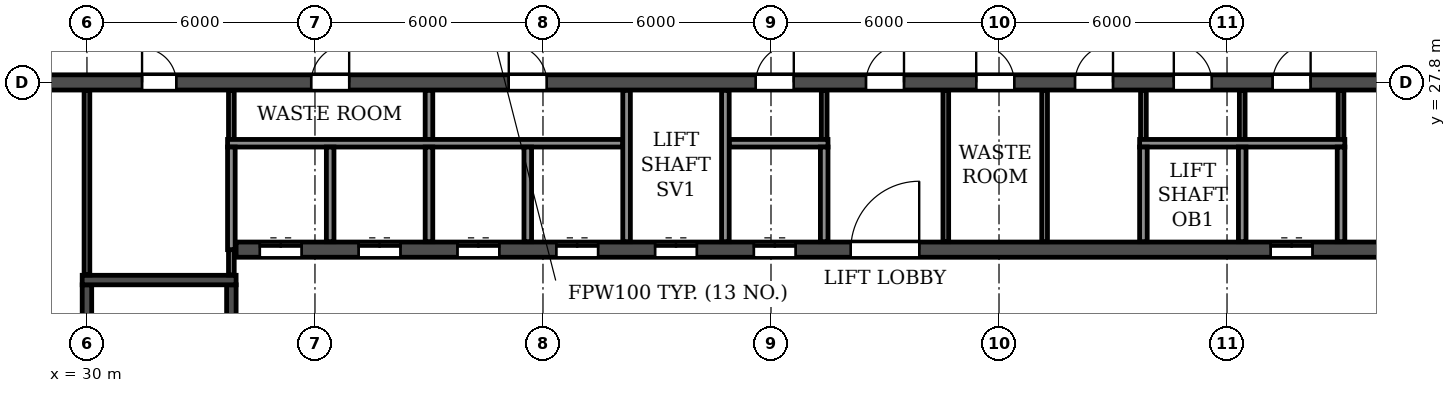
"""IFC4 building model, lengths in metres.
Left out: names, types, materials, properties, quantities, classifications, styles, units other than length and angle.
Written with IfcOpenShell. Run it as: python <this file> out.ifc"""

import sys

from ifc_helpers import new_model, si_unit, direction, frame, frame_2d, origin, place, context, subcontext, project, spatial, rectangle, extrude, element, fill, save


model = new_model("IFC4")
c1 = context("Model", 3, precision=1e-05, world=origin(), true_north=direction((0.0, 1.0)))
c2 = subcontext(c1, "Body", "Model", "MODEL_VIEW")
j1 = project(units=[si_unit("LENGTHUNIT", "METRE"), si_unit("PLANEANGLEUNIT", "RADIAN")], contexts=[c1])
p1 = place(None, origin())
s1 = spatial("IfcSite", under=j1, at=p1, CompositionType="ELEMENT")
p2 = place(p1, origin())
s2 = spatial("IfcBuilding", under=s1, at=p2, CompositionType="ELEMENT")
p3 = place(p2, frame((0.0, 0.0, 208.2)))
s3 = spatial("IfcBuildingStorey", under=s2, at=p3, CompositionType="ELEMENT", Elevation=208.2)
p4 = place(p3, frame((18.2, 27.8, 0.0), z_axis=(0.0, 0.0, 1.0), x_axis=(1.0, 0.0, 0.0)))
e1 = element("IfcWall", 1, at=p4, inside=s3, PredefinedType="SOLIDWALL", context=c2, shape_type="SweptSolid", body=[
    extrude(rectangle(XDim=65.6, YDim=0.4, at=frame_2d((32.8, 0.0))), origin(), (0.0, 0.0, 1.0), 3.0),
])
p5 = place(p4, frame((0.7, 0.0, 0.0)))
e2 = element("IfcOpeningElement", 2, at=p5, cuts=e1, PredefinedType="OPENING", context=c2, shape_type="SweptSolid", body=[
    extrude(rectangle(XDim=1.0, YDim=2.1, at=frame_2d((0.5, 1.05))), frame((0.0, 0.21, 0.0), z_axis=(0.0, -1.0, 0.0), x_axis=(1.0, 0.0, 0.0)), (0.0, 0.0, 1.0), 0.42),
])
p6 = place(p4, frame((4.05, 0.0, 0.0)))
e3 = element("IfcOpeningElement", 3, at=p6, cuts=e1, PredefinedType="OPENING", context=c2, shape_type="SweptSolid", body=[
    extrude(rectangle(XDim=0.9, YDim=2.1, at=frame_2d((0.45, 1.05))), frame((0.0, 0.21, 0.0), z_axis=(0.0, -1.0, 0.0), x_axis=(1.0, 0.0, 0.0)), (0.0, 0.0, 1.0), 0.42),
])
p7 = place(p4, frame((13.25, 0.0, 0.0)))
e4 = element("IfcOpeningElement", 4, at=p7, cuts=e1, PredefinedType="OPENING", context=c2, shape_type="SweptSolid", body=[
    extrude(rectangle(XDim=0.9, YDim=2.1, at=frame_2d((0.45, 1.05))), frame((0.0, 0.21, 0.0), z_axis=(0.0, -1.0, 0.0), x_axis=(1.0, 0.0, 0.0)), (0.0, 0.0, 1.0), 0.42),
])
p8 = place(p4, frame((17.7, 0.0, 0.0)))
e5 = element("IfcOpeningElement", 5, at=p8, cuts=e1, PredefinedType="OPENING", context=c2, shape_type="SweptSolid", body=[
    extrude(rectangle(XDim=1.0, YDim=2.1, at=frame_2d((0.5, 1.05))), frame((0.0, 0.21, 0.0), z_axis=(0.0, -1.0, 0.0), x_axis=(1.0, 0.0, 0.0)), (0.0, 0.0, 1.0), 0.42),
])
p9 = place(p4, frame((22.9, 0.0, 0.0)))
e6 = element("IfcOpeningElement", 6, at=p9, cuts=e1, PredefinedType="OPENING", context=c2, shape_type="SweptSolid", body=[
    extrude(rectangle(XDim=1.0, YDim=2.1, at=frame_2d((0.5, 1.05))), frame((0.0, 0.21, 0.0), z_axis=(0.0, -1.0, 0.0), x_axis=(1.0, 0.0, 0.0)), (0.0, 0.0, 1.0), 0.42),
])
p10 = place(p4, frame((29.4, 0.0, 0.0)))
e7 = element("IfcOpeningElement", 7, at=p10, cuts=e1, PredefinedType="OPENING", context=c2, shape_type="SweptSolid", body=[
    extrude(rectangle(XDim=1.0, YDim=2.1, at=frame_2d((0.5, 1.05))), frame((0.0, 0.21, 0.0), z_axis=(0.0, -1.0, 0.0), x_axis=(1.0, 0.0, 0.0)), (0.0, 0.0, 1.0), 0.42),
])
p11 = place(p4, frame((32.3, 0.0, 0.0)))
e8 = element("IfcOpeningElement", 8, at=p11, cuts=e1, PredefinedType="OPENING", context=c2, shape_type="SweptSolid", body=[
    extrude(rectangle(XDim=1.0, YDim=2.1, at=frame_2d((0.5, 1.05))), frame((0.0, 0.21, 0.0), z_axis=(0.0, -1.0, 0.0), x_axis=(1.0, 0.0, 0.0)), (0.0, 0.0, 1.0), 0.42),
])
p12 = place(p4, frame((35.2, 0.0, 0.0)))
e9 = element("IfcOpeningElement", 9, at=p12, cuts=e1, PredefinedType="OPENING", context=c2, shape_type="SweptSolid", body=[
    extrude(rectangle(XDim=1.0, YDim=2.1, at=frame_2d((0.5, 1.05))), frame((0.0, 0.21, 0.0), z_axis=(0.0, -1.0, 0.0), x_axis=(1.0, 0.0, 0.0)), (0.0, 0.0, 1.0), 0.42),
])
p13 = place(p4, frame((37.8, 0.0, 0.0)))
e10 = element("IfcOpeningElement", 10, at=p13, cuts=e1, PredefinedType="OPENING", context=c2, shape_type="SweptSolid", body=[
    extrude(rectangle(XDim=1.0, YDim=2.1, at=frame_2d((0.5, 1.05))), frame((0.0, 0.21, 0.0), z_axis=(0.0, -1.0, 0.0), x_axis=(1.0, 0.0, 0.0)), (0.0, 0.0, 1.0), 0.42),
])
p14 = place(p4, frame((40.4, 0.0, 0.0)))
e11 = element("IfcOpeningElement", 11, at=p14, cuts=e1, PredefinedType="OPENING", context=c2, shape_type="SweptSolid", body=[
    extrude(rectangle(XDim=1.0, YDim=2.1, at=frame_2d((0.5, 1.05))), frame((0.0, 0.21, 0.0), z_axis=(0.0, -1.0, 0.0), x_axis=(1.0, 0.0, 0.0)), (0.0, 0.0, 1.0), 0.42),
])
p15 = place(p4, frame((43.0, 0.0, 0.0)))
e12 = element("IfcOpeningElement", 12, at=p15, cuts=e1, PredefinedType="OPENING", context=c2, shape_type="SweptSolid", body=[
    extrude(rectangle(XDim=1.0, YDim=2.1, at=frame_2d((0.5, 1.05))), frame((0.0, 0.21, 0.0), z_axis=(0.0, -1.0, 0.0), x_axis=(1.0, 0.0, 0.0)), (0.0, 0.0, 1.0), 0.42),
])
p16 = place(p4, frame((46.9, 0.0, 0.0)))
e13 = element("IfcOpeningElement", 13, at=p16, cuts=e1, PredefinedType="OPENING", context=c2, shape_type="SweptSolid", body=[
    extrude(rectangle(XDim=1.0, YDim=2.1, at=frame_2d((0.5, 1.05))), frame((0.0, 0.21, 0.0), z_axis=(0.0, -1.0, 0.0), x_axis=(1.0, 0.0, 0.0)), (0.0, 0.0, 1.0), 0.42),
])
p17 = place(p4, frame((51.45, 0.0, 0.0)))
e14 = element("IfcOpeningElement", 14, at=p17, cuts=e1, PredefinedType="OPENING", context=c2, shape_type="SweptSolid", body=[
    extrude(rectangle(XDim=0.9, YDim=2.1, at=frame_2d((0.45, 1.05))), frame((0.0, 0.21, 0.0), z_axis=(0.0, -1.0, 0.0), x_axis=(1.0, 0.0, 0.0)), (0.0, 0.0, 1.0), 0.42),
])
p18 = place(p4, frame((60.65, 0.0, 0.0)))
e15 = element("IfcOpeningElement", 15, at=p18, cuts=e1, PredefinedType="OPENING", context=c2, shape_type="SweptSolid", body=[
    extrude(rectangle(XDim=0.9, YDim=2.1, at=frame_2d((0.45, 1.05))), frame((0.0, 0.21, 0.0), z_axis=(0.0, -1.0, 0.0), x_axis=(1.0, 0.0, 0.0)), (0.0, 0.0, 1.0), 0.42),
])
p19 = place(p4, frame((63.9, 0.0, 0.0)))
e16 = element("IfcOpeningElement", 16, at=p19, cuts=e1, PredefinedType="OPENING", context=c2, shape_type="SweptSolid", body=[
    extrude(rectangle(XDim=1.0, YDim=2.1, at=frame_2d((0.5, 1.05))), frame((0.0, 0.21, 0.0), z_axis=(0.0, -1.0, 0.0), x_axis=(1.0, 0.0, 0.0)), (0.0, 0.0, 1.0), 0.42),
])
p20 = place(p3, frame((33.925, 23.4, 0.0), z_axis=(0.0, 0.0, 1.0), x_axis=(1.0, 0.0, 0.0)))
e17 = element("IfcWall", 17, at=p20, inside=s3, PredefinedType="SOLIDWALL", context=c2, shape_type="SweptSolid", body=[
    extrude(rectangle(XDim=34.15, YDim=0.4, at=frame_2d((17.075, 0.0))), origin(), (0.0, 0.0, 1.0), 3.0),
])
p21 = place(p20, frame((16.175, 0.0, 0.0)))
e18 = element("IfcOpeningElement", 18, at=p21, cuts=e17, PredefinedType="OPENING", context=c2, shape_type="SweptSolid", body=[
    extrude(rectangle(XDim=1.8, YDim=2.1, at=frame_2d((0.9, 1.05))), frame((0.0, 0.21, 0.0), z_axis=(0.0, -1.0, 0.0), x_axis=(1.0, 0.0, 0.0)), (0.0, 0.0, 1.0), 0.42),
])
p22 = place(p20, frame((0.625, 0.0, 0.0)))
e19 = element("IfcOpeningElement", 19, at=p22, cuts=e17, PredefinedType="OPENING", context=c2, shape_type="SweptSolid", body=[
    extrude(rectangle(XDim=1.1, YDim=2.1, at=frame_2d((0.55, 1.05))), frame((0.0, 0.21, 0.0), z_axis=(0.0, -1.0, 0.0), x_axis=(1.0, 0.0, 0.0)), (0.0, 0.0, 1.0), 0.42),
])
p23 = place(p20, frame((3.225, 0.0, 0.0)))
e20 = element("IfcOpeningElement", 20, at=p23, cuts=e17, PredefinedType="OPENING", context=c2, shape_type="SweptSolid", body=[
    extrude(rectangle(XDim=1.1, YDim=2.1, at=frame_2d((0.55, 1.05))), frame((0.0, 0.21, 0.0), z_axis=(0.0, -1.0, 0.0), x_axis=(1.0, 0.0, 0.0)), (0.0, 0.0, 1.0), 0.42),
])
p24 = place(p20, frame((5.825, 0.0, 0.0)))
e21 = element("IfcOpeningElement", 21, at=p24, cuts=e17, PredefinedType="OPENING", context=c2, shape_type="SweptSolid", body=[
    extrude(rectangle(XDim=1.1, YDim=2.1, at=frame_2d((0.55, 1.05))), frame((0.0, 0.21, 0.0), z_axis=(0.0, -1.0, 0.0), x_axis=(1.0, 0.0, 0.0)), (0.0, 0.0, 1.0), 0.42),
])
p25 = place(p20, frame((8.425, 0.0, 0.0)))
e22 = element("IfcOpeningElement", 22, at=p25, cuts=e17, PredefinedType="OPENING", context=c2, shape_type="SweptSolid", body=[
    extrude(rectangle(XDim=1.1, YDim=2.1, at=frame_2d((0.55, 1.05))), frame((0.0, 0.21, 0.0), z_axis=(0.0, -1.0, 0.0), x_axis=(1.0, 0.0, 0.0)), (0.0, 0.0, 1.0), 0.42),
])
p26 = place(p20, frame((11.025, 0.0, 0.0)))
e23 = element("IfcOpeningElement", 23, at=p26, cuts=e17, PredefinedType="OPENING", context=c2, shape_type="SweptSolid", body=[
    extrude(rectangle(XDim=1.1, YDim=2.1, at=frame_2d((0.55, 1.05))), frame((0.0, 0.21, 0.0), z_axis=(0.0, -1.0, 0.0), x_axis=(1.0, 0.0, 0.0)), (0.0, 0.0, 1.0), 0.42),
])
p27 = place(p20, frame((13.625, 0.0, 0.0)))
e24 = element("IfcOpeningElement", 24, at=p27, cuts=e17, PredefinedType="OPENING", context=c2, shape_type="SweptSolid", body=[
    extrude(rectangle(XDim=1.1, YDim=2.1, at=frame_2d((0.55, 1.05))), frame((0.0, 0.21, 0.0), z_axis=(0.0, -1.0, 0.0), x_axis=(1.0, 0.0, 0.0)), (0.0, 0.0, 1.0), 0.42),
])
p28 = place(p20, frame((27.225, 0.0, 0.0)))
e25 = element("IfcOpeningElement", 25, at=p28, cuts=e17, PredefinedType="OPENING", context=c2, shape_type="SweptSolid", body=[
    extrude(rectangle(XDim=1.1, YDim=2.1, at=frame_2d((0.55, 1.05))), frame((0.0, 0.21, 0.0), z_axis=(0.0, -1.0, 0.0), x_axis=(1.0, 0.0, 0.0)), (0.0, 0.0, 1.0), 0.42),
])
p29 = place(p3, frame((30.0, 14.8, 0.0), z_axis=(0.0, 0.0, 1.0), x_axis=(0.0, 1.0, 0.0)))
e26 = element("IfcWall", 26, at=p29, inside=s3, PredefinedType="SOLIDWALL", context=c2, shape_type="SweptSolid", body=[
    extrude(rectangle(XDim=7.675, YDim=0.25, at=frame_2d((3.837, 0.0))), origin(), (0.0, 0.0, 1.0), 3.0),
])
p30 = place(p3, frame((33.8, 14.8, 0.0), z_axis=(0.0, 0.0, 1.0), x_axis=(0.0, 1.0, 0.0)))
e27 = element("IfcWall", 27, at=p30, inside=s3, PredefinedType="SOLIDWALL", context=c2, shape_type="SweptSolid", body=[
    extrude(rectangle(XDim=7.675, YDim=0.25, at=frame_2d((3.837, 0.0))), origin(), (0.0, 0.0, 1.0), 3.0),
])
p31 = place(p30, frame((0.5, 0.0, 0.0)))
e28 = element("IfcOpeningElement", 28, at=p31, cuts=e27, PredefinedType="OPENING", context=c2, shape_type="SweptSolid", body=[
    extrude(rectangle(XDim=1.0, YDim=2.1, at=frame_2d((0.5, 1.05))), frame((0.0, 0.135, 0.0), z_axis=(0.0, -1.0, 0.0), x_axis=(1.0, 0.0, 0.0)), (0.0, 0.0, 1.0), 0.27),
])
p32 = place(p3, frame((29.875, 22.6, 0.0), z_axis=(0.0, 0.0, 1.0), x_axis=(1.0, 0.0, 0.0)))
e29 = element("IfcWall", 29, at=p32, inside=s3, PredefinedType="SOLIDWALL", context=c2, shape_type="SweptSolid", body=[
    extrude(rectangle(XDim=4.05, YDim=0.25, at=frame_2d((2.025, 0.0))), origin(), (0.0, 0.0, 1.0), 3.0),
])
p33 = place(p3, frame((49.4, 26.3, 0.0), z_axis=(0.0, 0.0, 1.0), x_axis=(0.0, 1.0, 0.0)))
e30 = element("IfcWall", 30, at=p33, inside=s3, PredefinedType="PARTITIONING", context=c2, shape_type="SweptSolid", body=[
    extrude(rectangle(XDim=1.29, YDim=0.15, at=frame_2d((0.645, 0.0))), origin(), (0.0, 0.0, 1.0), 3.0),
])
for number, where, z_axis, x_axis in (
    (31, (52.6, 23.61, 0.0), (0.0, 0.0, 1.0), (0.0, 1.0, 0.0)),
    (32, (55.2, 23.61, 0.0), (0.0, 0.0, 1.0), (0.0, 1.0, 0.0)),
):
    element("IfcWall", number, at=place(p3, frame(where, z_axis=z_axis, x_axis=x_axis)), inside=s3, PredefinedType="PARTITIONING", context=c2, shape_type="SweptSolid", body=[
        extrude(rectangle(XDim=3.98, YDim=0.15, at=frame_2d((1.99, 0.0))), origin(), (0.0, 0.0, 1.0), 3.0),
    ])
for number, where, z_axis, x_axis in (
    (33, (57.8, 26.3, 0.0), (0.0, 0.0, 1.0), (0.0, 1.0, 0.0)),
    (34, (60.4, 26.3, 0.0), (0.0, 0.0, 1.0), (0.0, 1.0, 0.0)),
    (35, (63.0, 26.3, 0.0), (0.0, 0.0, 1.0), (0.0, 1.0, 0.0)),
):
    element("IfcWall", number, at=place(p3, frame(where, z_axis=z_axis, x_axis=x_axis)), inside=s3, PredefinedType="PARTITIONING", context=c2, shape_type="SweptSolid", body=[
        extrude(rectangle(XDim=1.29, YDim=0.15, at=frame_2d((0.645, 0.0))), origin(), (0.0, 0.0, 1.0), 3.0),
    ])
p34 = place(p3, frame((39.0, 26.3, 0.0), z_axis=(0.0, 0.0, 1.0), x_axis=(0.0, 1.0, 0.0)))
e36 = element("IfcWall", 36, at=p34, inside=s3, PredefinedType="PARTITIONING", context=c2, shape_type="SweptSolid", body=[
    extrude(rectangle(XDim=1.29, YDim=0.2, at=frame_2d((0.645, 0.0))), origin(), (0.0, 0.0, 1.0), 3.0),
])
p35 = place(p3, frame((30.0, 22.735, 0.0), z_axis=(0.0, 0.0, 1.0), x_axis=(0.0, 1.0, 0.0)))
e37 = element("IfcWall", 37, at=p35, inside=s3, PredefinedType="PARTITIONING", context=c2, shape_type="SweptSolid", body=[
    extrude(rectangle(XDim=4.855, YDim=0.15, at=frame_2d((2.427, 0.0))), origin(), (0.0, 0.0, 1.0), 3.0),
])
p36 = place(p3, frame((33.8, 22.735, 0.0), z_axis=(0.0, 0.0, 1.0), x_axis=(0.0, 1.0, 0.0)))
e38 = element("IfcWall", 38, at=p36, inside=s3, PredefinedType="PARTITIONING", context=c2, shape_type="SweptSolid", body=[
    extrude(rectangle(XDim=0.665, YDim=0.15, at=frame_2d((0.333, 0.0))), origin(), (0.0, 0.0, 1.0), 3.0),
])
p37 = place(p3, frame((33.8, 26.3, 0.0), z_axis=(0.0, 0.0, 1.0), x_axis=(0.0, 1.0, 0.0)))
e39 = element("IfcWall", 39, at=p37, inside=s3, PredefinedType="PARTITIONING", context=c2, shape_type="SweptSolid", body=[
    extrude(rectangle(XDim=1.29, YDim=0.15, at=frame_2d((0.645, 0.0))), origin(), (0.0, 0.0, 1.0), 3.0),
])
p38 = place(p3, frame((33.7, 26.2, 0.0), z_axis=(0.0, 0.0, 1.0), x_axis=(1.0, 0.0, 0.0)))
e40 = element("IfcWall", 40, at=p38, inside=s3, PredefinedType="PARTITIONING", context=c2, shape_type="SweptSolid", body=[
    extrude(rectangle(XDim=10.4, YDim=0.2, at=frame_2d((5.2, 0.0))), origin(), (0.0, 0.0, 1.0), 3.0),
])
p39 = place(p3, frame((46.9, 26.2, 0.0), z_axis=(0.0, 0.0, 1.0), x_axis=(1.0, 0.0, 0.0)))
e41 = element("IfcWall", 41, at=p39, inside=s3, PredefinedType="PARTITIONING", context=c2, shape_type="SweptSolid", body=[
    extrude(rectangle(XDim=2.6, YDim=0.2, at=frame_2d((1.3, 0.0))), origin(), (0.0, 0.0, 1.0), 3.0),
])
p40 = place(p3, frame((57.7, 26.2, 0.0), z_axis=(0.0, 0.0, 1.0), x_axis=(1.0, 0.0, 0.0)))
e42 = element("IfcWall", 42, at=p40, inside=s3, PredefinedType="PARTITIONING", context=c2, shape_type="SweptSolid", body=[
    extrude(rectangle(XDim=5.4, YDim=0.2, at=frame_2d((2.7, 0.0))), origin(), (0.0, 0.0, 1.0), 3.0),
])
p41 = place(p3, frame((33.8, 23.4, 0.0), z_axis=(0.0, 0.0, 1.0), x_axis=(0.0, 1.0, 0.0)))
e43 = element("IfcWall", 43, at=p41, inside=s3, PredefinedType="PARTITIONING", context=c2, shape_type="SweptSolid", body=[
    extrude(rectangle(XDim=2.7, YDim=0.2, at=frame_2d((1.35, 0.0))), origin(), (0.0, 0.0, 1.0), 3.0),
])
for number, where, z_axis, x_axis in (
    (44, (36.4, 23.61, 0.0), (0.0, 0.0, 1.0), (0.0, 1.0, 0.0)),
    (45, (39.0, 23.61, 0.0), (0.0, 0.0, 1.0), (0.0, 1.0, 0.0)),
    (46, (41.6, 23.61, 0.0), (0.0, 0.0, 1.0), (0.0, 1.0, 0.0)),
):
    element("IfcWall", number, at=place(p3, frame(where, z_axis=z_axis, x_axis=x_axis)), inside=s3, PredefinedType="PARTITIONING", context=c2, shape_type="SweptSolid", body=[
        extrude(rectangle(XDim=2.49, YDim=0.2, at=frame_2d((1.245, 0.0))), origin(), (0.0, 0.0, 1.0), 3.0),
    ])
for number, where, z_axis, x_axis in (
    (47, (44.2, 23.61, 0.0), (0.0, 0.0, 1.0), (0.0, 1.0, 0.0)),
    (48, (46.8, 23.61, 0.0), (0.0, 0.0, 1.0), (0.0, 1.0, 0.0)),
):
    element("IfcWall", number, at=place(p3, frame(where, z_axis=z_axis, x_axis=x_axis)), inside=s3, PredefinedType="PARTITIONING", context=c2, shape_type="SweptSolid", body=[
        extrude(rectangle(XDim=3.98, YDim=0.2, at=frame_2d((1.99, 0.0))), origin(), (0.0, 0.0, 1.0), 3.0),
    ])
for number, where, z_axis, x_axis in (
    (49, (49.4, 23.61, 0.0), (0.0, 0.0, 1.0), (0.0, 1.0, 0.0)),
    (50, (57.8, 23.61, 0.0), (0.0, 0.0, 1.0), (0.0, 1.0, 0.0)),
    (51, (60.4, 23.61, 0.0), (0.0, 0.0, 1.0), (0.0, 1.0, 0.0)),
    (52, (63.0, 23.61, 0.0), (0.0, 0.0, 1.0), (0.0, 1.0, 0.0)),
):
    element("IfcWall", number, at=place(p3, frame(where, z_axis=z_axis, x_axis=x_axis)), inside=s3, PredefinedType="PARTITIONING", context=c2, shape_type="SweptSolid", body=[
        extrude(rectangle(XDim=2.49, YDim=0.2, at=frame_2d((1.245, 0.0))), origin(), (0.0, 0.0, 1.0), 3.0),
    ])
p42 = place(p7, origin())
e53 = element("IfcDoor", 53, at=p42, inside=s3, OperationType="SINGLE_SWING_LEFT", PredefinedType="DOOR", context=c2, shape_type="SweptSolid", body=[
    extrude(rectangle(XDim=0.9, YDim=2.1, at=frame_2d((0.45, 1.05))), frame((0.0, 0.025, 0.0), z_axis=(0.0, -1.0, 0.0), x_axis=(1.0, 0.0, 0.0)), (0.0, 0.0, 1.0), 0.05),
])
fill(e4, e53)
p43 = place(p8, origin())
e54 = element("IfcDoor", 54, at=p43, inside=s3, OperationType="SINGLE_SWING_RIGHT", PredefinedType="DOOR", context=c2, shape_type="SweptSolid", body=[
    extrude(rectangle(XDim=1.0, YDim=2.1, at=frame_2d((0.5, 1.05))), frame((0.0, 0.025, 0.0), z_axis=(0.0, -1.0, 0.0), x_axis=(1.0, 0.0, 0.0)), (0.0, 0.0, 1.0), 0.05),
])
fill(e5, e54)
p44 = place(p9, origin())
e55 = element("IfcDoor", 55, at=p44, inside=s3, OperationType="SINGLE_SWING_LEFT", PredefinedType="DOOR", context=c2, shape_type="SweptSolid", body=[
    extrude(rectangle(XDim=1.0, YDim=2.1, at=frame_2d((0.5, 1.05))), frame((0.0, 0.025, 0.0), z_axis=(0.0, -1.0, 0.0), x_axis=(1.0, 0.0, 0.0)), (0.0, 0.0, 1.0), 0.05),
])
fill(e6, e55)
p45 = place(p10, origin())
e56 = element("IfcDoor", 56, at=p45, inside=s3, OperationType="SINGLE_SWING_RIGHT", PredefinedType="DOOR", context=c2, shape_type="SweptSolid", body=[
    extrude(rectangle(XDim=1.0, YDim=2.1, at=frame_2d((0.5, 1.05))), frame((0.0, 0.025, 0.0), z_axis=(0.0, -1.0, 0.0), x_axis=(1.0, 0.0, 0.0)), (0.0, 0.0, 1.0), 0.05),
])
fill(e7, e56)
p46 = place(p11, origin())
e57 = element("IfcDoor", 57, at=p46, inside=s3, OperationType="SINGLE_SWING_RIGHT", PredefinedType="DOOR", context=c2, shape_type="SweptSolid", body=[
    extrude(rectangle(XDim=1.0, YDim=2.1, at=frame_2d((0.5, 1.05))), frame((0.0, 0.025, 0.0), z_axis=(0.0, -1.0, 0.0), x_axis=(1.0, 0.0, 0.0)), (0.0, 0.0, 1.0), 0.05),
])
fill(e8, e57)
p47 = place(p12, origin())
e58 = element("IfcDoor", 58, at=p47, inside=s3, OperationType="SINGLE_SWING_LEFT", PredefinedType="DOOR", context=c2, shape_type="SweptSolid", body=[
    extrude(rectangle(XDim=1.0, YDim=2.1, at=frame_2d((0.5, 1.05))), frame((0.0, 0.025, 0.0), z_axis=(0.0, -1.0, 0.0), x_axis=(1.0, 0.0, 0.0)), (0.0, 0.0, 1.0), 0.05),
])
fill(e9, e58)
p48 = place(p13, origin())
e59 = element("IfcDoor", 59, at=p48, inside=s3, OperationType="SINGLE_SWING_RIGHT", PredefinedType="DOOR", context=c2, shape_type="SweptSolid", body=[
    extrude(rectangle(XDim=1.0, YDim=2.1, at=frame_2d((0.5, 1.05))), frame((0.0, 0.025, 0.0), z_axis=(0.0, -1.0, 0.0), x_axis=(1.0, 0.0, 0.0)), (0.0, 0.0, 1.0), 0.05),
])
fill(e10, e59)
p49 = place(p14, origin())
e60 = element("IfcDoor", 60, at=p49, inside=s3, OperationType="SINGLE_SWING_LEFT", PredefinedType="DOOR", context=c2, shape_type="SweptSolid", body=[
    extrude(rectangle(XDim=1.0, YDim=2.1, at=frame_2d((0.5, 1.05))), frame((0.0, 0.025, 0.0), z_axis=(0.0, -1.0, 0.0), x_axis=(1.0, 0.0, 0.0)), (0.0, 0.0, 1.0), 0.05),
])
fill(e11, e60)
p50 = place(p15, origin())
e61 = element("IfcDoor", 61, at=p50, inside=s3, OperationType="SINGLE_SWING_RIGHT", PredefinedType="DOOR", context=c2, shape_type="SweptSolid", body=[
    extrude(rectangle(XDim=1.0, YDim=2.1, at=frame_2d((0.5, 1.05))), frame((0.0, 0.025, 0.0), z_axis=(0.0, -1.0, 0.0), x_axis=(1.0, 0.0, 0.0)), (0.0, 0.0, 1.0), 0.05),
])
fill(e12, e61)
p51 = place(p21, origin())
e62 = element("IfcDoor", 62, at=p51, inside=s3, OperationType="DOUBLE_DOOR_SINGLE_SWING", PredefinedType="DOOR", context=c2, shape_type="SweptSolid", body=[
    extrude(rectangle(XDim=1.8, YDim=2.1, at=frame_2d((0.9, 1.05))), frame((0.0, 0.025, 0.0), z_axis=(0.0, -1.0, 0.0), x_axis=(1.0, 0.0, 0.0)), (0.0, 0.0, 1.0), 0.05),
])
fill(e18, e62)
p52 = place(p22, origin())
e63 = element("IfcDoor", 63, at=p52, inside=s3, OperationType="DOUBLE_DOOR_SLIDING", PredefinedType="DOOR", context=c2, shape_type="SweptSolid", body=[
    extrude(rectangle(XDim=1.1, YDim=2.1, at=frame_2d((0.55, 1.05))), frame((0.0, 0.025, 0.0), z_axis=(0.0, -1.0, 0.0), x_axis=(1.0, 0.0, 0.0)), (0.0, 0.0, 1.0), 0.05),
])
fill(e19, e63)
p53 = place(p23, origin())
e64 = element("IfcDoor", 64, at=p53, inside=s3, OperationType="DOUBLE_DOOR_SLIDING", PredefinedType="DOOR", context=c2, shape_type="SweptSolid", body=[
    extrude(rectangle(XDim=1.1, YDim=2.1, at=frame_2d((0.55, 1.05))), frame((0.0, 0.025, 0.0), z_axis=(0.0, -1.0, 0.0), x_axis=(1.0, 0.0, 0.0)), (0.0, 0.0, 1.0), 0.05),
])
fill(e20, e64)
p54 = place(p24, origin())
e65 = element("IfcDoor", 65, at=p54, inside=s3, OperationType="DOUBLE_DOOR_SLIDING", PredefinedType="DOOR", context=c2, shape_type="SweptSolid", body=[
    extrude(rectangle(XDim=1.1, YDim=2.1, at=frame_2d((0.55, 1.05))), frame((0.0, 0.025, 0.0), z_axis=(0.0, -1.0, 0.0), x_axis=(1.0, 0.0, 0.0)), (0.0, 0.0, 1.0), 0.05),
])
fill(e21, e65)
p55 = place(p25, origin())
e66 = element("IfcDoor", 66, at=p55, inside=s3, OperationType="DOUBLE_DOOR_SLIDING", PredefinedType="DOOR", context=c2, shape_type="SweptSolid", body=[
    extrude(rectangle(XDim=1.1, YDim=2.1, at=frame_2d((0.55, 1.05))), frame((0.0, 0.025, 0.0), z_axis=(0.0, -1.0, 0.0), x_axis=(1.0, 0.0, 0.0)), (0.0, 0.0, 1.0), 0.05),
])
fill(e22, e66)
p56 = place(p26, origin())
e67 = element("IfcDoor", 67, at=p56, inside=s3, OperationType="DOUBLE_DOOR_SLIDING", PredefinedType="DOOR", context=c2, shape_type="SweptSolid", body=[
    extrude(rectangle(XDim=1.1, YDim=2.1, at=frame_2d((0.55, 1.05))), frame((0.0, 0.025, 0.0), z_axis=(0.0, -1.0, 0.0), x_axis=(1.0, 0.0, 0.0)), (0.0, 0.0, 1.0), 0.05),
])
fill(e23, e67)
p57 = place(p27, origin())
e68 = element("IfcDoor", 68, at=p57, inside=s3, OperationType="DOUBLE_DOOR_SLIDING", PredefinedType="DOOR", context=c2, shape_type="SweptSolid", body=[
    extrude(rectangle(XDim=1.1, YDim=2.1, at=frame_2d((0.55, 1.05))), frame((0.0, 0.025, 0.0), z_axis=(0.0, -1.0, 0.0), x_axis=(1.0, 0.0, 0.0)), (0.0, 0.0, 1.0), 0.05),
])
fill(e24, e68)
p58 = place(p28, origin())
e69 = element("IfcDoor", 69, at=p58, inside=s3, OperationType="DOUBLE_DOOR_SLIDING", PredefinedType="DOOR", context=c2, shape_type="SweptSolid", body=[
    extrude(rectangle(XDim=1.1, YDim=2.1, at=frame_2d((0.55, 1.05))), frame((0.0, 0.025, 0.0), z_axis=(0.0, -1.0, 0.0), x_axis=(1.0, 0.0, 0.0)), (0.0, 0.0, 1.0), 0.05),
])
fill(e25, e69)
save(model, sys.argv[1])
